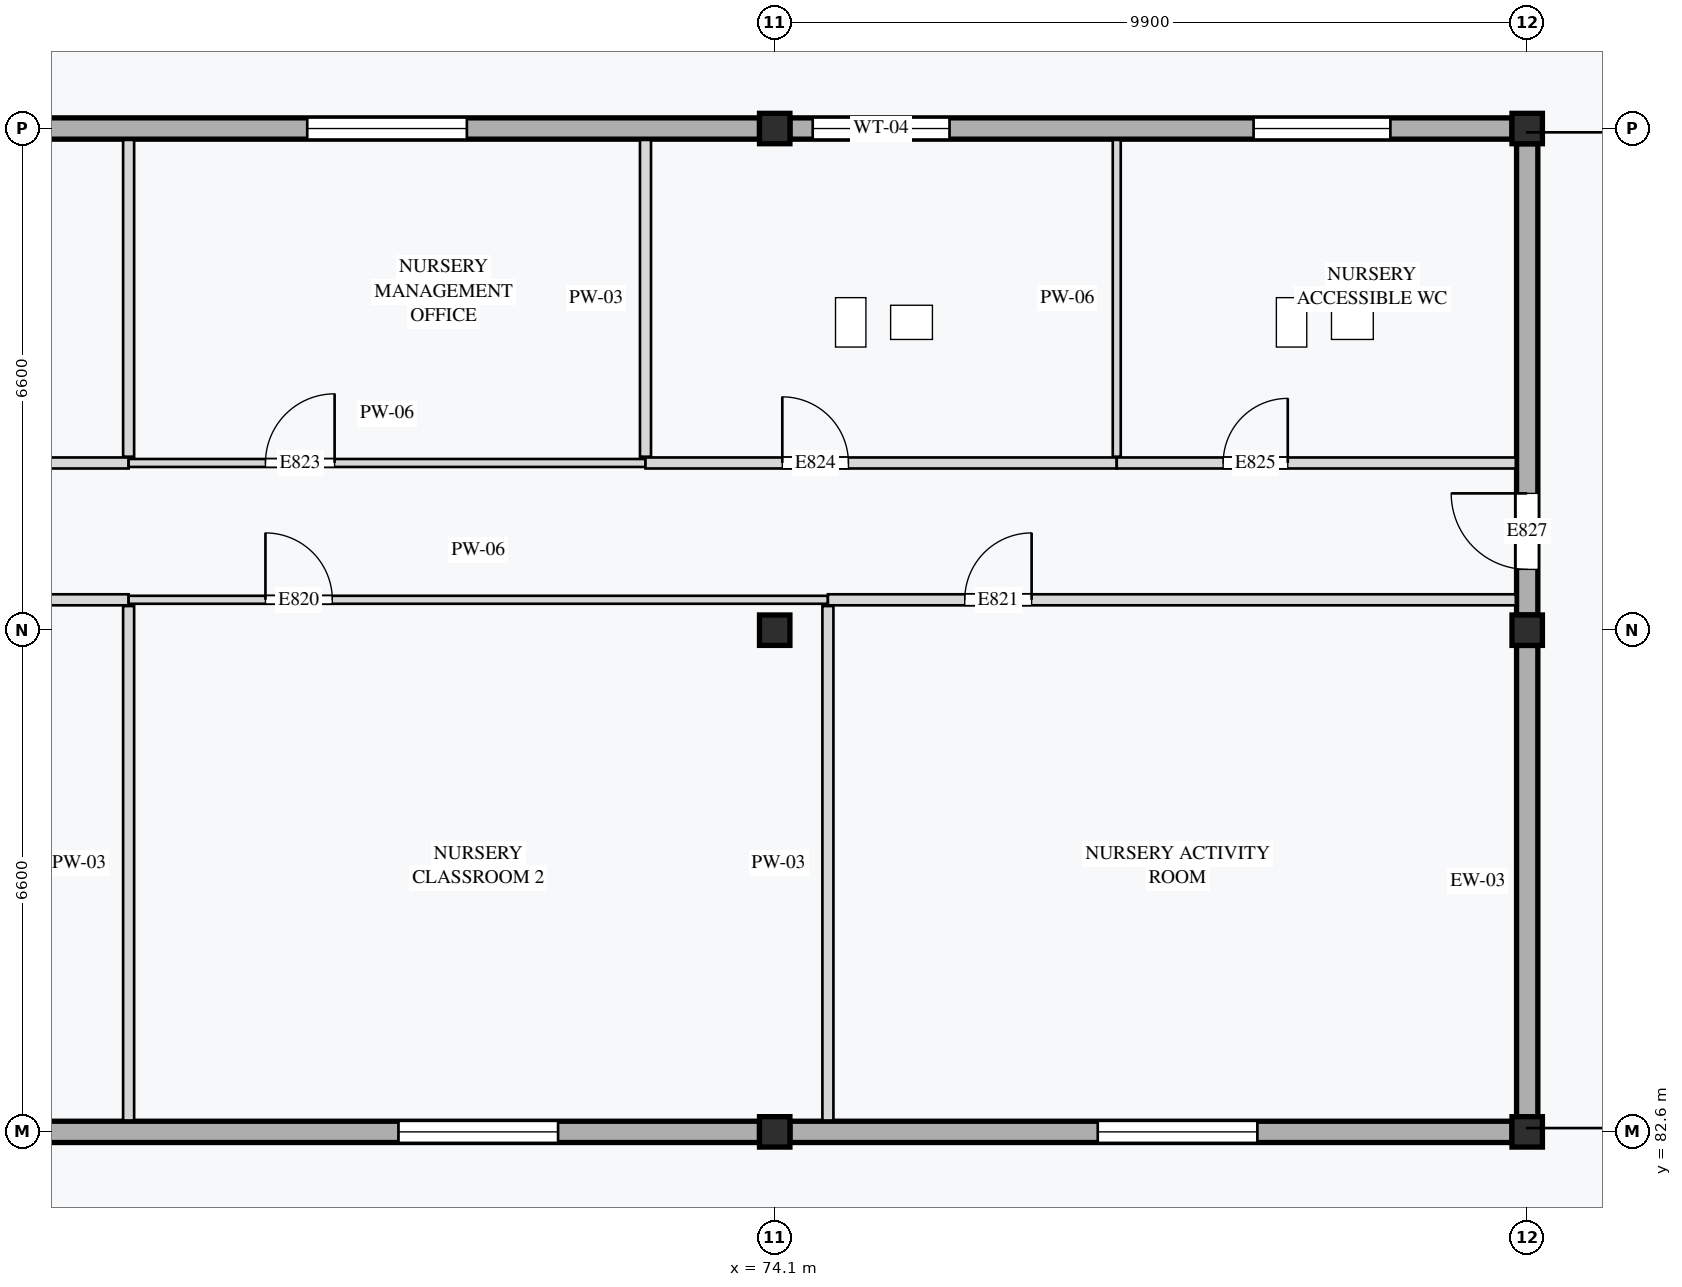
"""IFC4 building model, lengths in metres.
Left out: names, types, materials, properties, quantities, classifications, styles, units other than length and angle.
Written with IfcOpenShell. Run it as: python <this file> out.ifc"""

import sys

from ifc_helpers import new_model, si_unit, direction, frame, frame_2d, origin, origin_2d, place, context, subcontext, project, spatial, rectangle, extrude, element, fill, save


model = new_model("IFC4")
c1 = context("Model", 3, precision=1e-05, world=origin(), true_north=direction((0.0, 1.0)))
c2 = subcontext(c1, "Body", "Model", "MODEL_VIEW")
j1 = project(units=[si_unit("LENGTHUNIT", "METRE"), si_unit("PLANEANGLEUNIT", "RADIAN")], contexts=[c1])
p1 = place(None, origin())
s1 = spatial("IfcSite", under=j1, at=p1, CompositionType="ELEMENT")
p2 = place(p1, origin())
s2 = spatial("IfcBuilding", under=s1, at=p2, CompositionType="ELEMENT")
p3 = place(p2, frame((0.0, 0.0, 4.2)))
s3 = spatial("IfcBuildingStorey", under=s2, at=p3, CompositionType="ELEMENT", Elevation=4.2)
for number, where, z_axis, x_axis in (
    (1, (74.1, 82.6, 0.0), (0.0, 0.0, 1.0), (1.0, 0.0, 0.0)),
    (2, (74.1, 89.2, 0.0), (0.0, 0.0, 1.0), (1.0, 0.0, 0.0)),
    (3, (74.1, 95.8, 0.0), (0.0, 0.0, 1.0), (1.0, 0.0, 0.0)),
    (4, (84.0, 82.6, 0.0), (0.0, 0.0, 1.0), (1.0, 0.0, 0.0)),
    (5, (84.0, 89.2, 0.0), (0.0, 0.0, 1.0), (1.0, 0.0, 0.0)),
    (6, (84.0, 95.8, 0.0), (0.0, 0.0, 1.0), (1.0, 0.0, 0.0)),
):
    element("IfcColumn", number, at=place(p3, frame(where, z_axis=z_axis, x_axis=x_axis)), inside=s3, PredefinedType="COLUMN", context=c2, shape_type="SweptSolid", body=[
        extrude(rectangle(XDim=0.4, YDim=0.4, at=origin_2d()), origin(), (0.0, 0.0, 1.0), 4.2),
    ])
p4 = place(p3, frame((64.4, 82.6, 0.0), z_axis=(0.0, 0.0, 1.0), x_axis=(1.0, 0.0, 0.0)))
e7 = element("IfcWall", 7, at=p4, inside=s3, PredefinedType="STANDARD", context=c2, shape_type="SweptSolid", body=[
    extrude(rectangle(XDim=9.5, YDim=0.28, at=frame_2d((4.75, 0.0))), origin(), (0.0, 0.0, 1.0), 3.45),
])
p5 = place(p4, frame((4.75, 0.0, 0.85)))
e8 = element("IfcOpeningElement", 8, at=p5, cuts=e7, PredefinedType="OPENING", context=c2, shape_type="SweptSolid", body=[
    extrude(rectangle(XDim=2.1, YDim=1.55, at=frame_2d((1.05, 0.775))), frame((0.0, 0.15, 0.0), z_axis=(0.0, -1.0, 0.0), x_axis=(1.0, 0.0, 0.0)), (0.0, 0.0, 1.0), 0.3),
])
p6 = place(p3, frame((64.4, 95.8, 0.0), z_axis=(0.0, 0.0, 1.0), x_axis=(1.0, 0.0, 0.0)))
e9 = element("IfcWall", 9, at=p6, inside=s3, PredefinedType="STANDARD", context=c2, shape_type="SweptSolid", body=[
    extrude(rectangle(XDim=9.5, YDim=0.28, at=frame_2d((4.75, 0.0))), origin(), (0.0, 0.0, 1.0), 3.45),
])
p7 = place(p6, frame((3.55, 0.0, 0.85)))
e10 = element("IfcOpeningElement", 10, at=p7, cuts=e9, PredefinedType="OPENING", context=c2, shape_type="SweptSolid", body=[
    extrude(rectangle(XDim=2.1, YDim=1.55, at=frame_2d((1.05, 0.775))), frame((0.0, 0.15, 0.0), z_axis=(0.0, -1.0, 0.0), x_axis=(1.0, 0.0, 0.0)), (0.0, 0.0, 1.0), 0.3),
])
p8 = place(p3, frame((74.3, 82.6, 0.0), z_axis=(0.0, 0.0, 1.0), x_axis=(1.0, 0.0, 0.0)))
e11 = element("IfcWall", 11, at=p8, inside=s3, PredefinedType="STANDARD", context=c2, shape_type="SweptSolid", body=[
    extrude(rectangle(XDim=9.5, YDim=0.28, at=frame_2d((4.75, 0.0))), origin(), (0.0, 0.0, 1.0), 3.45),
])
p9 = place(p8, frame((4.05, 0.0, 0.85)))
e12 = element("IfcOpeningElement", 12, at=p9, cuts=e11, PredefinedType="OPENING", context=c2, shape_type="SweptSolid", body=[
    extrude(rectangle(XDim=2.1, YDim=1.55, at=frame_2d((1.05, 0.775))), frame((0.0, 0.15, 0.0), z_axis=(0.0, -1.0, 0.0), x_axis=(1.0, 0.0, 0.0)), (0.0, 0.0, 1.0), 0.3),
])
p10 = place(p3, frame((74.3, 95.8, 0.0), z_axis=(0.0, 0.0, 1.0), x_axis=(1.0, 0.0, 0.0)))
e13 = element("IfcWall", 13, at=p10, inside=s3, PredefinedType="STANDARD", context=c2, shape_type="SweptSolid", body=[
    extrude(rectangle(XDim=9.5, YDim=0.28, at=frame_2d((4.75, 0.0))), origin(), (0.0, 0.0, 1.0), 3.45),
])
p11 = place(p10, frame((0.3, 0.0, 0.85)))
e14 = element("IfcOpeningElement", 14, at=p11, cuts=e13, PredefinedType="OPENING", context=c2, shape_type="SweptSolid", body=[
    extrude(rectangle(XDim=1.8, YDim=1.55, at=frame_2d((0.9, 0.775))), frame((0.0, 0.15, 0.0), z_axis=(0.0, -1.0, 0.0), x_axis=(1.0, 0.0, 0.0)), (0.0, 0.0, 1.0), 0.3),
])
p12 = place(p10, frame((6.1, 0.0, 0.85)))
e15 = element("IfcOpeningElement", 15, at=p12, cuts=e13, PredefinedType="OPENING", context=c2, shape_type="SweptSolid", body=[
    extrude(rectangle(XDim=1.8, YDim=1.55, at=frame_2d((0.9, 0.775))), frame((0.0, 0.15, 0.0), z_axis=(0.0, -1.0, 0.0), x_axis=(1.0, 0.0, 0.0)), (0.0, 0.0, 1.0), 0.3),
])
p13 = place(p3, frame((84.0, 82.8, 0.0), z_axis=(0.0, 0.0, 1.0), x_axis=(0.0, 1.0, 0.0)))
e16 = element("IfcWall", 16, at=p13, inside=s3, PredefinedType="STANDARD", context=c2, shape_type="SweptSolid", body=[
    extrude(rectangle(XDim=6.2, YDim=0.28, at=frame_2d((3.1, 0.0))), origin(), (0.0, 0.0, 1.0), 3.55),
])
p14 = place(p3, frame((84.0, 89.4, 0.0), z_axis=(0.0, 0.0, 1.0), x_axis=(0.0, 1.0, 0.0)))
e17 = element("IfcWall", 17, at=p14, inside=s3, PredefinedType="STANDARD", context=c2, shape_type="SweptSolid", body=[
    extrude(rectangle(XDim=6.2, YDim=0.28, at=frame_2d((3.1, 0.0))), origin(), (0.0, 0.0, 1.0), 3.55),
])
p15 = place(p14, frame((0.6, 0.0, 0.0)))
e18 = element("IfcOpeningElement", 18, at=p15, cuts=e17, PredefinedType="OPENING", context=c2, shape_type="SweptSolid", body=[
    extrude(rectangle(XDim=1.0, YDim=2.15, at=frame_2d((0.5, 1.075))), frame((0.0, 0.15, 0.0), z_axis=(0.0, -1.0, 0.0), x_axis=(1.0, 0.0, 0.0)), (0.0, 0.0, 1.0), 0.3),
])
p16 = place(p3, frame((56.6, 89.6, 0.0), z_axis=(0.0, 0.0, 1.0), x_axis=(1.0, 0.0, 0.0)))
e19 = element("IfcWall", 19, at=p16, inside=s3, PredefinedType="PARTITIONING", context=c2, shape_type="SweptSolid", body=[
    extrude(rectangle(XDim=9.0, YDim=0.145, at=frame_2d((4.5, 0.0))), origin(), (0.0, 0.0, 1.0), 3.94),
])
p17 = place(p16, frame((1.6, 0.0, 0.0)))
e20 = element("IfcOpeningElement", 20, at=p17, cuts=e19, PredefinedType="OPENING", context=c2, shape_type="SweptSolid", body=[
    extrude(rectangle(XDim=0.98, YDim=2.12, at=frame_2d((0.49, 1.06))), frame((0.0, 0.083, 0.0), z_axis=(0.0, -1.0, 0.0), x_axis=(1.0, 0.0, 0.0)), (0.0, 0.0, 1.0), 0.165),
])
p18 = place(p3, frame((65.6, 89.6, 0.0), z_axis=(0.0, 0.0, 1.0), x_axis=(1.0, 0.0, 0.0)))
e21 = element("IfcWall", 21, at=p18, inside=s3, PredefinedType="PARTITIONING", context=c2, shape_type="SweptSolid", body=[
    extrude(rectangle(XDim=9.2, YDim=0.105, at=frame_2d((4.6, 0.0))), origin(), (0.0, 0.0, 1.0), 3.94),
])
p19 = place(p18, frame((1.8, 0.0, 0.0)))
e22 = element("IfcOpeningElement", 22, at=p19, cuts=e21, PredefinedType="OPENING", context=c2, shape_type="SweptSolid", body=[
    extrude(rectangle(XDim=0.88, YDim=2.1, at=frame_2d((0.44, 1.05))), frame((0.0, 0.062, 0.0), z_axis=(0.0, -1.0, 0.0), x_axis=(1.0, 0.0, 0.0)), (0.0, 0.0, 1.0), 0.125),
])
p20 = place(p3, frame((65.6, 82.75, 0.0), z_axis=(0.0, 0.0, 1.0), x_axis=(0.0, 1.0, 0.0)))
e23 = element("IfcWall", 23, at=p20, inside=s3, PredefinedType="PARTITIONING", context=c2, shape_type="SweptSolid", body=[
    extrude(rectangle(XDim=6.768, YDim=0.145, at=frame_2d((3.384, 0.0))), origin(), (0.0, 0.0, 1.0), 3.94),
])
p21 = place(p3, frame((74.8, 89.6, 0.0), z_axis=(0.0, 0.0, 1.0), x_axis=(1.0, 0.0, 0.0)))
e24 = element("IfcWall", 24, at=p21, inside=s3, PredefinedType="PARTITIONING", context=c2, shape_type="SweptSolid", body=[
    extrude(rectangle(XDim=9.05, YDim=0.145, at=frame_2d((4.525, 0.0))), origin(), (0.0, 0.0, 1.0), 3.94),
])
p22 = place(p21, frame((1.8, 0.0, 0.0)))
e25 = element("IfcOpeningElement", 25, at=p22, cuts=e24, PredefinedType="OPENING", context=c2, shape_type="SweptSolid", body=[
    extrude(rectangle(XDim=0.88, YDim=2.16, at=frame_2d((0.44, 1.08))), frame((0.0, 0.083, 0.0), z_axis=(0.0, -1.0, 0.0), x_axis=(1.0, 0.0, 0.0)), (0.0, 0.0, 1.0), 0.165),
])
p23 = place(p3, frame((74.8, 82.75, 0.0), z_axis=(0.0, 0.0, 1.0), x_axis=(0.0, 1.0, 0.0)))
e26 = element("IfcWall", 26, at=p23, inside=s3, PredefinedType="PARTITIONING", context=c2, shape_type="SweptSolid", body=[
    extrude(rectangle(XDim=6.768, YDim=0.145, at=frame_2d((3.384, 0.0))), origin(), (0.0, 0.0, 1.0), 3.94),
])
p24 = place(p3, frame((56.6, 91.4, 0.0), z_axis=(0.0, 0.0, 1.0), x_axis=(1.0, 0.0, 0.0)))
e27 = element("IfcWall", 27, at=p24, inside=s3, PredefinedType="PARTITIONING", context=c2, shape_type="SweptSolid", body=[
    extrude(rectangle(XDim=9.0, YDim=0.145, at=frame_2d((4.5, 0.0))), origin(), (0.0, 0.0, 1.0), 3.94),
])
p25 = place(p24, frame((1.6, 0.0, 0.0)))
e28 = element("IfcOpeningElement", 28, at=p25, cuts=e27, PredefinedType="OPENING", context=c2, shape_type="SweptSolid", body=[
    extrude(rectangle(XDim=0.86, YDim=2.12, at=frame_2d((0.43, 1.06))), frame((0.0, 0.083, 0.0), z_axis=(0.0, -1.0, 0.0), x_axis=(1.0, 0.0, 0.0)), (0.0, 0.0, 1.0), 0.165),
])
p26 = place(p3, frame((65.6, 91.4, 0.0), z_axis=(0.0, 0.0, 1.0), x_axis=(1.0, 0.0, 0.0)))
e29 = element("IfcWall", 29, at=p26, inside=s3, PredefinedType="PARTITIONING", context=c2, shape_type="SweptSolid", body=[
    extrude(rectangle(XDim=6.8, YDim=0.105, at=frame_2d((3.4, 0.0))), origin(), (0.0, 0.0, 1.0), 3.94),
])
p27 = place(p26, frame((1.8, 0.0, 0.0)))
e30 = element("IfcOpeningElement", 30, at=p27, cuts=e29, PredefinedType="OPENING", context=c2, shape_type="SweptSolid", body=[
    extrude(rectangle(XDim=0.91, YDim=2.14, at=frame_2d((0.455, 1.07))), frame((0.0, 0.062, 0.0), z_axis=(0.0, -1.0, 0.0), x_axis=(1.0, 0.0, 0.0)), (0.0, 0.0, 1.0), 0.125),
])
p28 = place(p3, frame((65.6, 91.482, 0.0), z_axis=(0.0, 0.0, 1.0), x_axis=(0.0, 1.0, 0.0)))
e31 = element("IfcWall", 31, at=p28, inside=s3, PredefinedType="PARTITIONING", context=c2, shape_type="SweptSolid", body=[
    extrude(rectangle(XDim=4.167, YDim=0.145, at=frame_2d((2.084, 0.0))), origin(), (0.0, 0.0, 1.0), 3.94),
])
p29 = place(p3, frame((72.4, 91.4, 0.0), z_axis=(0.0, 0.0, 1.0), x_axis=(1.0, 0.0, 0.0)))
e32 = element("IfcWall", 32, at=p29, inside=s3, PredefinedType="PARTITIONING", context=c2, shape_type="SweptSolid", body=[
    extrude(rectangle(XDim=6.2, YDim=0.145, at=frame_2d((3.1, 0.0))), origin(), (0.0, 0.0, 1.0), 3.94),
])
p30 = place(p29, frame((1.8, 0.0, 0.0)))
e33 = element("IfcOpeningElement", 33, at=p30, cuts=e32, PredefinedType="OPENING", context=c2, shape_type="SweptSolid", body=[
    extrude(rectangle(XDim=0.87, YDim=2.08, at=frame_2d((0.435, 1.04))), frame((0.0, 0.083, 0.0), z_axis=(0.0, -1.0, 0.0), x_axis=(1.0, 0.0, 0.0)), (0.0, 0.0, 1.0), 0.165),
])
p31 = place(p3, frame((72.4, 91.482, 0.0), z_axis=(0.0, 0.0, 1.0), x_axis=(0.0, 1.0, 0.0)))
e34 = element("IfcWall", 34, at=p31, inside=s3, PredefinedType="PARTITIONING", context=c2, shape_type="SweptSolid", body=[
    extrude(rectangle(XDim=4.167, YDim=0.145, at=frame_2d((2.084, 0.0))), origin(), (0.0, 0.0, 1.0), 3.94),
])
p32 = place(p3, frame((78.6, 91.4, 0.0), z_axis=(0.0, 0.0, 1.0), x_axis=(1.0, 0.0, 0.0)))
e35 = element("IfcWall", 35, at=p32, inside=s3, PredefinedType="PARTITIONING", context=c2, shape_type="SweptSolid", body=[
    extrude(rectangle(XDim=5.25, YDim=0.145, at=frame_2d((2.625, 0.0))), origin(), (0.0, 0.0, 1.0), 3.94),
])
p33 = place(p32, frame((1.4, 0.0, 0.0)))
e36 = element("IfcOpeningElement", 36, at=p33, cuts=e35, PredefinedType="OPENING", context=c2, shape_type="SweptSolid", body=[
    extrude(rectangle(XDim=0.85, YDim=2.1, at=frame_2d((0.425, 1.05))), frame((0.0, 0.083, 0.0), z_axis=(0.0, -1.0, 0.0), x_axis=(1.0, 0.0, 0.0)), (0.0, 0.0, 1.0), 0.165),
])
p34 = place(p3, frame((78.6, 91.482, 0.0), z_axis=(0.0, 0.0, 1.0), x_axis=(0.0, 1.0, 0.0)))
e37 = element("IfcWall", 37, at=p34, inside=s3, PredefinedType="PARTITIONING", context=c2, shape_type="SweptSolid", body=[
    extrude(rectangle(XDim=4.167, YDim=0.105, at=frame_2d((2.084, 0.0))), origin(), (0.0, 0.0, 1.0), 3.94),
])
p35 = place(p5, origin())
e38 = element("IfcWindow", 38, at=p35, inside=s3, PartitioningType="SINGLE_PANEL", PredefinedType="WINDOW", context=c2, shape_type="SweptSolid", body=[
    extrude(rectangle(XDim=2.1, YDim=1.55, at=frame_2d((1.05, 0.775))), frame((0.0, 0.03, 0.0), z_axis=(0.0, -1.0, 0.0), x_axis=(1.0, 0.0, 0.0)), (0.0, 0.0, 1.0), 0.06),
])
fill(e8, e38)
p36 = place(p9, origin())
e39 = element("IfcWindow", 39, at=p36, inside=s3, PartitioningType="SINGLE_PANEL", PredefinedType="WINDOW", context=c2, shape_type="SweptSolid", body=[
    extrude(rectangle(XDim=2.1, YDim=1.55, at=frame_2d((1.05, 0.775))), frame((0.0, 0.03, 0.0), z_axis=(0.0, -1.0, 0.0), x_axis=(1.0, 0.0, 0.0)), (0.0, 0.0, 1.0), 0.06),
])
fill(e12, e39)
p37 = place(p7, origin())
e40 = element("IfcWindow", 40, at=p37, inside=s3, PartitioningType="SINGLE_PANEL", PredefinedType="WINDOW", context=c2, shape_type="SweptSolid", body=[
    extrude(rectangle(XDim=2.1, YDim=1.55, at=frame_2d((1.05, 0.775))), frame((0.0, 0.03, 0.0), z_axis=(0.0, -1.0, 0.0), x_axis=(1.0, 0.0, 0.0)), (0.0, 0.0, 1.0), 0.06),
])
fill(e10, e40)
p38 = place(p11, origin())
e41 = element("IfcWindow", 41, at=p38, inside=s3, PartitioningType="SINGLE_PANEL", PredefinedType="WINDOW", context=c2, shape_type="SweptSolid", body=[
    extrude(rectangle(XDim=1.8, YDim=1.55, at=frame_2d((0.9, 0.775))), frame((0.0, 0.03, 0.0), z_axis=(0.0, -1.0, 0.0), x_axis=(1.0, 0.0, 0.0)), (0.0, 0.0, 1.0), 0.06),
])
fill(e14, e41)
p39 = place(p12, origin())
e42 = element("IfcWindow", 42, at=p39, inside=s3, PartitioningType="SINGLE_PANEL", PredefinedType="WINDOW", context=c2, shape_type="SweptSolid", body=[
    extrude(rectangle(XDim=1.8, YDim=1.55, at=frame_2d((0.9, 0.775))), frame((0.0, 0.03, 0.0), z_axis=(0.0, -1.0, 0.0), x_axis=(1.0, 0.0, 0.0)), (0.0, 0.0, 1.0), 0.06),
])
fill(e15, e42)
p40 = place(p15, origin())
e43 = element("IfcDoor", 43, at=p40, inside=s3, OperationType="SINGLE_SWING_RIGHT", PredefinedType="DOOR", context=c2, shape_type="SweptSolid", body=[
    extrude(rectangle(XDim=1.0, YDim=2.15, at=frame_2d((0.5, 1.075))), frame((0.0, 0.025, 0.0), z_axis=(0.0, -1.0, 0.0), x_axis=(1.0, 0.0, 0.0)), (0.0, 0.0, 1.0), 0.05),
])
fill(e18, e43)
p41 = place(p19, origin())
e44 = element("IfcDoor", 44, at=p41, inside=s3, OperationType="SINGLE_SWING_LEFT", PredefinedType="DOOR", context=c2, shape_type="SweptSolid", body=[
    extrude(rectangle(XDim=0.88, YDim=2.1, at=frame_2d((0.44, 1.05))), frame((0.0, 0.025, 0.0), z_axis=(0.0, -1.0, 0.0), x_axis=(1.0, 0.0, 0.0)), (0.0, 0.0, 1.0), 0.05),
])
fill(e22, e44)
p42 = place(p22, origin())
e45 = element("IfcDoor", 45, at=p42, inside=s3, OperationType="SINGLE_SWING_RIGHT", PredefinedType="DOOR", context=c2, shape_type="SweptSolid", body=[
    extrude(rectangle(XDim=0.88, YDim=2.16, at=frame_2d((0.44, 1.08))), frame((0.0, 0.025, 0.0), z_axis=(0.0, -1.0, 0.0), x_axis=(1.0, 0.0, 0.0)), (0.0, 0.0, 1.0), 0.05),
])
fill(e25, e45)
p43 = place(p27, origin())
e46 = element("IfcDoor", 46, at=p43, inside=s3, OperationType="SINGLE_SWING_RIGHT", PredefinedType="DOOR", context=c2, shape_type="SweptSolid", body=[
    extrude(rectangle(XDim=0.91, YDim=2.14, at=frame_2d((0.455, 1.07))), frame((0.0, 0.025, 0.0), z_axis=(0.0, -1.0, 0.0), x_axis=(1.0, 0.0, 0.0)), (0.0, 0.0, 1.0), 0.05),
])
fill(e30, e46)
p44 = place(p30, origin())
e47 = element("IfcDoor", 47, at=p44, inside=s3, OperationType="SINGLE_SWING_LEFT", PredefinedType="DOOR", context=c2, shape_type="SweptSolid", body=[
    extrude(rectangle(XDim=0.87, YDim=2.08, at=frame_2d((0.435, 1.04))), frame((0.0, 0.025, 0.0), z_axis=(0.0, -1.0, 0.0), x_axis=(1.0, 0.0, 0.0)), (0.0, 0.0, 1.0), 0.05),
])
fill(e33, e47)
p45 = place(p33, origin())
e48 = element("IfcDoor", 48, at=p45, inside=s3, OperationType="SINGLE_SWING_RIGHT", PredefinedType="DOOR", context=c2, shape_type="SweptSolid", body=[
    extrude(rectangle(XDim=0.85, YDim=2.1, at=frame_2d((0.425, 1.05))), frame((0.0, 0.025, 0.0), z_axis=(0.0, -1.0, 0.0), x_axis=(1.0, 0.0, 0.0)), (0.0, 0.0, 1.0), 0.05),
])
fill(e36, e48)
save(model, sys.argv[1])
